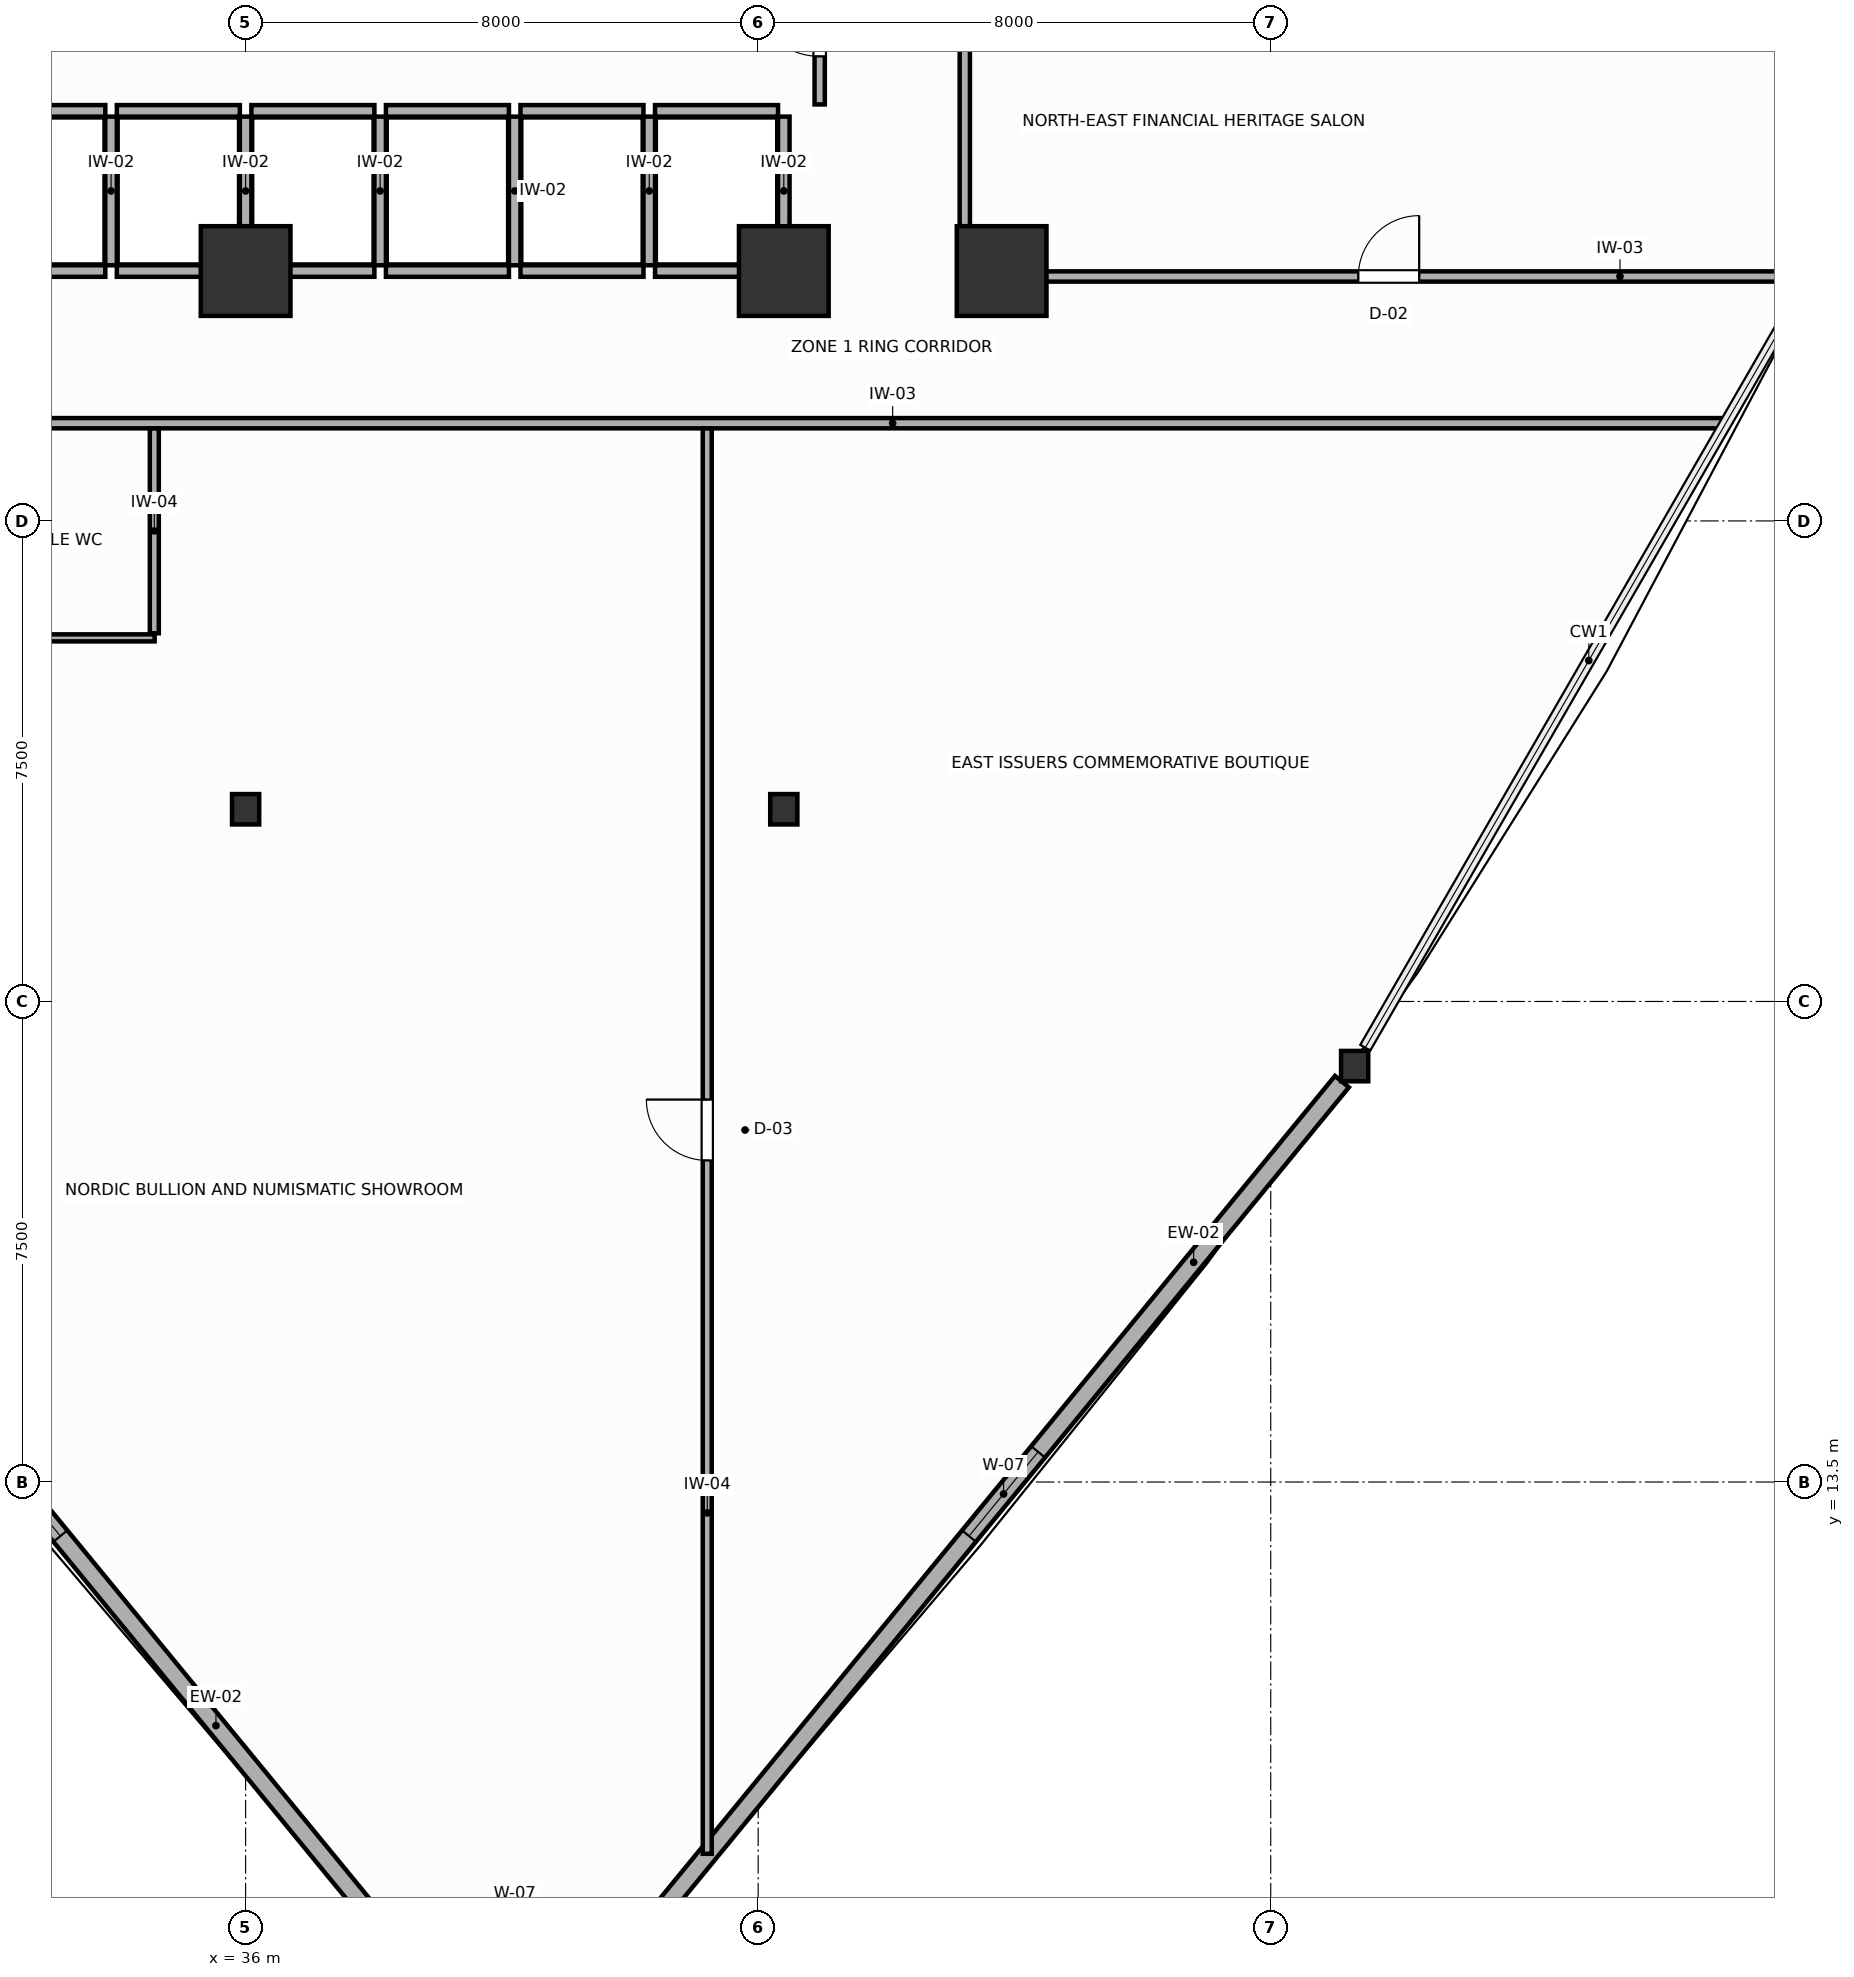
"""IFC4 building model, lengths in metres.
Left out: names, types, materials, properties, quantities, classifications, styles, units other than length and angle.
Written with IfcOpenShell. Run it as: python <this file> out.ifc"""

import sys

from ifc_helpers import new_model, si_unit, direction, frame, frame_2d, origin, origin_2d, place, context, subcontext, project, spatial, rectangle, i_section, extrude, source, transform, mapped, element, fill, save


model = new_model("IFC4")
c1 = context("Model", 3, precision=1e-05, world=origin(), true_north=direction((0.0, 1.0)))
c2 = subcontext(c1, "Body", "Model", "MODEL_VIEW")
j1 = project(units=[si_unit("LENGTHUNIT", "METRE"), si_unit("PLANEANGLEUNIT", "RADIAN")], contexts=[c1])
p1 = place(None, origin())
s1 = spatial("IfcSite", under=j1, at=p1, CompositionType="ELEMENT")
p2 = place(p1, origin())
s2 = spatial("IfcBuilding", under=s1, at=p2, CompositionType="ELEMENT")
p3 = place(p2, frame((0.0, 0.0, 95.1)))
s3 = spatial("IfcBuildingStorey", under=s2, at=p3, CompositionType="ELEMENT", Elevation=95.1)
m1 = source(origin(), c2, "Body", "SweptSolid", [
    extrude(rectangle(XDim=1.4, YDim=1.4, at=origin_2d()), origin(), (0.0, 0.0, 1.0), 3.9),
])
for number, where, z_axis, x_axis in (
    (1, (44.4, 32.4, 0.0), (0.0, 0.0, 1.0), (1.0, 0.0, 0.0)),
    (2, (36.0, 32.4, 0.0), (0.0, 0.0, 1.0), (1.0, 0.0, 0.0)),
    (3, (47.8, 32.4, 0.0), (0.0, 0.0, 1.0), (1.0, 0.0, 0.0)),
):
    element("IfcColumn", number, at=place(p3, frame(where, z_axis=z_axis, x_axis=x_axis)), inside=s3, PredefinedType="COLUMN", context=c2, shape_type="MappedRepresentation", body=[
        mapped(m1, transform((0.0, 0.0, 0.0), scale=1.0)),
    ])
m2 = source(origin(), c2, "Body", "SweptSolid", [
    extrude(i_section(OverallWidth=0.424, OverallDepth=0.474, WebThickness=0.045, FlangeThickness=0.072, FilletRadius=0.015, at=origin_2d()), origin(), (0.0, 0.0, 1.0), 3.9),
])
for number, where, z_axis, x_axis in (
    (4, (44.4, 24.0, 0.0), (0.0, 0.0, 1.0), (1.0, 0.0, 0.0)),
    (5, (36.0, 24.0, 0.0), (0.0, 0.0, 1.0), (1.0, 0.0, 0.0)),
    (6, (53.31, 19.991, 0.0), (0.0, 0.0, 1.0), (1.0, 0.0, 0.0)),
):
    element("IfcColumn", number, at=place(p3, frame(where, z_axis=z_axis, x_axis=x_axis)), inside=s3, PredefinedType="COLUMN", context=c2, shape_type="MappedRepresentation", body=[
        mapped(m2, transform((0.0, 0.0, 0.0), scale=1.0)),
    ])
p4 = place(p3, frame((27.289, 19.749, 0.0), z_axis=(0.0, 0.0, 1.0), x_axis=(0.634363798099, -0.77303465101, 0.0)))
e7 = element("IfcWall", 7, at=p4, inside=s3, PredefinedType="SOLIDWALL", context=c2, shape_type="SweptSolid", body=[
    extrude(rectangle(XDim=16.65, YDim=0.28, at=frame_2d((8.325, 0.0))), origin(), (0.0, 0.0, 1.0), 2.07),
])
p5 = place(p4, frame((7.475, 0.0, 0.75)))
e8 = element("IfcOpeningElement", 8, at=p5, cuts=e7, PredefinedType="OPENING", context=c2, shape_type="SweptSolid", body=[
    extrude(rectangle(XDim=1.7, YDim=1.1, at=frame_2d((0.85, 0.55))), frame((0.0, 0.15, 0.0), z_axis=(0.0, -1.0, 0.0), x_axis=(1.0, 0.0, 0.0)), (0.0, 0.0, 1.0), 0.3),
])
p6 = place(p3, frame((42.549, 6.878, 0.0), z_axis=(0.0, 0.0, 1.0), x_axis=(0.634372560511, 0.77302746036, 0.0)))
e9 = element("IfcWall", 9, at=p6, inside=s3, PredefinedType="SOLIDWALL", context=c2, shape_type="SweptSolid", body=[
    extrude(rectangle(XDim=16.65, YDim=0.28, at=frame_2d((8.325, 0.0))), origin(), (0.0, 0.0, 1.0), 2.07),
])
p7 = place(p6, frame((7.475, 0.0, 0.75)))
e10 = element("IfcOpeningElement", 10, at=p7, cuts=e9, PredefinedType="OPENING", context=c2, shape_type="SweptSolid", body=[
    extrude(rectangle(XDim=1.7, YDim=1.1, at=frame_2d((0.85, 0.55))), frame((0.0, 0.15, 0.0), z_axis=(0.0, -1.0, 0.0), x_axis=(1.0, 0.0, 0.0)), (0.0, 0.0, 1.0), 0.3),
])
p8 = place(p3, frame((31.89, 34.9, 0.0), z_axis=(0.0, 0.0, 1.0), x_axis=(1.0, 0.0, 0.0)))
e11 = element("IfcWall", 11, at=p8, inside=s3, PredefinedType="PARTITIONING", context=c2, shape_type="SweptSolid", body=[
    extrude(rectangle(XDim=1.92, YDim=0.18, at=frame_2d((0.96, 0.0))), origin(), (0.0, 0.0, 1.0), 3.7),
])
p9 = place(p3, frame((31.89, 32.4, 0.0), z_axis=(0.0, 0.0, 1.0), x_axis=(1.0, 0.0, 0.0)))
e12 = element("IfcWall", 12, at=p9, inside=s3, PredefinedType="PARTITIONING", context=c2, shape_type="SweptSolid", body=[
    extrude(rectangle(XDim=1.92, YDim=0.18, at=frame_2d((0.96, 0.0))), origin(), (0.0, 0.0, 1.0), 2.23),
])
p10 = place(p3, frame((33.99, 34.9, 0.0), z_axis=(0.0, 0.0, 1.0), x_axis=(1.0, 0.0, 0.0)))
e13 = element("IfcWall", 13, at=p10, inside=s3, PredefinedType="PARTITIONING", context=c2, shape_type="SweptSolid", body=[
    extrude(rectangle(XDim=1.92, YDim=0.18, at=frame_2d((0.96, 0.0))), origin(), (0.0, 0.0, 1.0), 3.7),
])
p11 = place(p3, frame((33.99, 32.4, 0.0), z_axis=(0.0, 0.0, 1.0), x_axis=(1.0, 0.0, 0.0)))
e14 = element("IfcWall", 14, at=p11, inside=s3, PredefinedType="PARTITIONING", context=c2, shape_type="SweptSolid", body=[
    extrude(rectangle(XDim=1.92, YDim=0.18, at=frame_2d((0.96, 0.0))), origin(), (0.0, 0.0, 1.0), 2.23),
])
p12 = place(p3, frame((33.9, 32.49, 0.0), z_axis=(0.0, 0.0, 1.0), x_axis=(0.0, 1.0, 0.0)))
e15 = element("IfcWall", 15, at=p12, inside=s3, PredefinedType="PARTITIONING", context=c2, shape_type="SweptSolid", body=[
    extrude(rectangle(XDim=2.32, YDim=0.18, at=frame_2d((1.16, 0.0))), origin(), (0.0, 0.0, 1.0), 3.7),
])
p13 = place(p3, frame((36.09, 34.9, 0.0), z_axis=(0.0, 0.0, 1.0), x_axis=(1.0, 0.0, 0.0)))
e16 = element("IfcWall", 16, at=p13, inside=s3, PredefinedType="PARTITIONING", context=c2, shape_type="SweptSolid", body=[
    extrude(rectangle(XDim=1.92, YDim=0.18, at=frame_2d((0.96, 0.0))), origin(), (0.0, 0.0, 1.0), 3.7),
])
p14 = place(p3, frame((36.09, 32.4, 0.0), z_axis=(0.0, 0.0, 1.0), x_axis=(1.0, 0.0, 0.0)))
e17 = element("IfcWall", 17, at=p14, inside=s3, PredefinedType="PARTITIONING", context=c2, shape_type="SweptSolid", body=[
    extrude(rectangle(XDim=1.92, YDim=0.18, at=frame_2d((0.96, 0.0))), origin(), (0.0, 0.0, 1.0), 2.23),
])
p15 = place(p3, frame((36.0, 32.49, 0.0), z_axis=(0.0, 0.0, 1.0), x_axis=(0.0, 1.0, 0.0)))
e18 = element("IfcWall", 18, at=p15, inside=s3, PredefinedType="PARTITIONING", context=c2, shape_type="SweptSolid", body=[
    extrude(rectangle(XDim=2.32, YDim=0.18, at=frame_2d((1.16, 0.0))), origin(), (0.0, 0.0, 1.0), 3.7),
])
p16 = place(p3, frame((38.19, 34.9, 0.0), z_axis=(0.0, 0.0, 1.0), x_axis=(1.0, 0.0, 0.0)))
e19 = element("IfcWall", 19, at=p16, inside=s3, PredefinedType="PARTITIONING", context=c2, shape_type="SweptSolid", body=[
    extrude(rectangle(XDim=1.92, YDim=0.18, at=frame_2d((0.96, 0.0))), origin(), (0.0, 0.0, 1.0), 3.7),
])
p17 = place(p3, frame((38.19, 32.4, 0.0), z_axis=(0.0, 0.0, 1.0), x_axis=(1.0, 0.0, 0.0)))
e20 = element("IfcWall", 20, at=p17, inside=s3, PredefinedType="PARTITIONING", context=c2, shape_type="SweptSolid", body=[
    extrude(rectangle(XDim=1.92, YDim=0.18, at=frame_2d((0.96, 0.0))), origin(), (0.0, 0.0, 1.0), 2.23),
])
p18 = place(p3, frame((38.1, 32.49, 0.0), z_axis=(0.0, 0.0, 1.0), x_axis=(0.0, 1.0, 0.0)))
e21 = element("IfcWall", 21, at=p18, inside=s3, PredefinedType="PARTITIONING", context=c2, shape_type="SweptSolid", body=[
    extrude(rectangle(XDim=2.32, YDim=0.18, at=frame_2d((1.16, 0.0))), origin(), (0.0, 0.0, 1.0), 3.7),
])
p19 = place(p3, frame((40.29, 34.9, 0.0), z_axis=(0.0, 0.0, 1.0), x_axis=(1.0, 0.0, 0.0)))
e22 = element("IfcWall", 22, at=p19, inside=s3, PredefinedType="PARTITIONING", context=c2, shape_type="SweptSolid", body=[
    extrude(rectangle(XDim=1.92, YDim=0.18, at=frame_2d((0.96, 0.0))), origin(), (0.0, 0.0, 1.0), 3.7),
])
p20 = place(p3, frame((40.29, 32.4, 0.0), z_axis=(0.0, 0.0, 1.0), x_axis=(1.0, 0.0, 0.0)))
e23 = element("IfcWall", 23, at=p20, inside=s3, PredefinedType="PARTITIONING", context=c2, shape_type="SweptSolid", body=[
    extrude(rectangle(XDim=1.92, YDim=0.18, at=frame_2d((0.96, 0.0))), origin(), (0.0, 0.0, 1.0), 2.23),
])
p21 = place(p3, frame((40.2, 32.49, 0.0), z_axis=(0.0, 0.0, 1.0), x_axis=(0.0, 1.0, 0.0)))
e24 = element("IfcWall", 24, at=p21, inside=s3, PredefinedType="PARTITIONING", context=c2, shape_type="SweptSolid", body=[
    extrude(rectangle(XDim=2.32, YDim=0.18, at=frame_2d((1.16, 0.0))), origin(), (0.0, 0.0, 1.0), 3.7),
])
p22 = place(p3, frame((42.39, 34.9, 0.0), z_axis=(0.0, 0.0, 1.0), x_axis=(1.0, 0.0, 0.0)))
e25 = element("IfcWall", 25, at=p22, inside=s3, PredefinedType="PARTITIONING", context=c2, shape_type="SweptSolid", body=[
    extrude(rectangle(XDim=1.92, YDim=0.18, at=frame_2d((0.96, 0.0))), origin(), (0.0, 0.0, 1.0), 3.7),
])
p23 = place(p3, frame((42.39, 32.4, 0.0), z_axis=(0.0, 0.0, 1.0), x_axis=(1.0, 0.0, 0.0)))
e26 = element("IfcWall", 26, at=p23, inside=s3, PredefinedType="PARTITIONING", context=c2, shape_type="SweptSolid", body=[
    extrude(rectangle(XDim=1.92, YDim=0.18, at=frame_2d((0.96, 0.0))), origin(), (0.0, 0.0, 1.0), 2.23),
])
for number, where, z_axis, x_axis in (
    (27, (42.3, 32.49, 0.0), (0.0, 0.0, 1.0), (0.0, 1.0, 0.0)),
    (28, (44.4, 32.49, 0.0), (0.0, 0.0, 1.0), (0.0, 1.0, 0.0)),
):
    element("IfcWall", number, at=place(p3, frame(where, z_axis=z_axis, x_axis=x_axis)), inside=s3, PredefinedType="PARTITIONING", context=c2, shape_type="SweptSolid", body=[
        extrude(rectangle(XDim=2.32, YDim=0.18, at=frame_2d((1.16, 0.0))), origin(), (0.0, 0.0, 1.0), 3.7),
    ])
p24 = place(p3, frame((44.96, 35.0, 0.0), z_axis=(0.0, 0.0, 1.0), x_axis=(0.0, 1.0, 0.0)))
e29 = element("IfcWall", 29, at=p24, inside=s3, PredefinedType="PARTITIONING", context=c2, shape_type="SweptSolid", body=[
    extrude(rectangle(XDim=2.65, YDim=0.16, at=frame_2d((1.325, 0.0))), origin(), (0.0, 0.0, 1.0), 3.7),
])
p25 = place(p24, frame((0.75, 0.0, 0.0)))
e30 = element("IfcOpeningElement", 30, at=p25, cuts=e29, PredefinedType="OPENING", context=c2, shape_type="SweptSolid", body=[
    extrude(rectangle(XDim=1.05, YDim=2.1, at=frame_2d((0.525, 1.05))), frame((0.0, 0.09, 0.0), z_axis=(0.0, -1.0, 0.0), x_axis=(1.0, 0.0, 0.0)), (0.0, 0.0, 1.0), 0.18),
])
p26 = place(p3, frame((21.317, 30.025, 0.0), z_axis=(0.0, 0.0, 1.0), x_axis=(1.0, 0.0, 0.0)))
e31 = element("IfcWall", 31, at=p26, inside=s3, PredefinedType="PARTITIONING", context=c2, shape_type="SweptSolid", body=[
    extrude(rectangle(XDim=37.766, YDim=0.16, at=frame_2d((18.883, 0.0))), origin(), (0.0, 0.0, 1.0), 3.7),
])
p27 = place(p26, frame((10.668, 0.0, 0.0)))
e32 = element("IfcOpeningElement", 32, at=p27, cuts=e31, PredefinedType="OPENING", context=c2, shape_type="SweptSolid", body=[
    extrude(rectangle(XDim=0.95, YDim=2.05, at=frame_2d((0.475, 1.025))), frame((0.0, 0.09, 0.0), z_axis=(0.0, -1.0, 0.0), x_axis=(1.0, 0.0, 0.0)), (0.0, 0.0, 1.0), 0.18),
])
p28 = place(p26, frame((0.93, 0.0, 0.0)))
e33 = element("IfcOpeningElement", 33, at=p28, cuts=e31, PredefinedType="OPENING", context=c2, shape_type="SweptSolid", body=[
    extrude(rectangle(XDim=0.95, YDim=2.05, at=frame_2d((0.475, 1.025))), frame((0.0, 0.09, 0.0), z_axis=(0.0, -1.0, 0.0), x_axis=(1.0, 0.0, 0.0)), (0.0, 0.0, 1.0), 0.18),
])
p29 = place(p3, frame((47.225, 32.31, 0.0), z_axis=(0.0, 0.0, 1.0), x_axis=(0.0, 1.0, 0.0)))
e34 = element("IfcWall", 34, at=p29, inside=s3, PredefinedType="PARTITIONING", context=c2, shape_type="SweptSolid", body=[
    extrude(rectangle(XDim=23.028, YDim=0.16, at=frame_2d((11.514, 0.0))), origin(), (0.0, 0.0, 1.0), 2.23),
])
p30 = place(p29, frame((11.59, 0.0, 0.0)))
e35 = element("IfcOpeningElement", 35, at=p30, cuts=e34, PredefinedType="OPENING", context=c2, shape_type="SweptSolid", body=[
    extrude(rectangle(XDim=0.95, YDim=2.05, at=frame_2d((0.475, 1.025))), frame((0.0, 0.09, 0.0), z_axis=(0.0, -1.0, 0.0), x_axis=(1.0, 0.0, 0.0)), (0.0, 0.0, 1.0), 0.18),
])
p31 = place(p3, frame((47.307, 32.315, 0.0), z_axis=(0.0, 0.0, 1.0), x_axis=(1.0, 0.0, 0.0)))
e36 = element("IfcWall", 36, at=p31, inside=s3, PredefinedType="PARTITIONING", context=c2, shape_type="SweptSolid", body=[
    extrude(rectangle(XDim=13.098, YDim=0.16, at=frame_2d((6.549, 0.0))), origin(), (0.0, 0.0, 1.0), 2.23),
])
p32 = place(p31, frame((6.06, 0.0, 0.0)))
e37 = element("IfcOpeningElement", 37, at=p32, cuts=e36, PredefinedType="OPENING", context=c2, shape_type="SweptSolid", body=[
    extrude(rectangle(XDim=0.95, YDim=2.05, at=frame_2d((0.475, 1.025))), frame((0.0, 0.09, 0.0), z_axis=(0.0, -1.0, 0.0), x_axis=(1.0, 0.0, 0.0)), (0.0, 0.0, 1.0), 0.18),
])
p33 = place(p3, frame((43.205, 7.698, 0.0), z_axis=(0.0, 0.0, 1.0), x_axis=(0.0, 1.0, 0.0)))
e38 = element("IfcWall", 38, at=p33, inside=s3, PredefinedType="PARTITIONING", context=c2, shape_type="SweptSolid", body=[
    extrude(rectangle(XDim=22.246, YDim=0.14, at=frame_2d((11.123, 0.0))), origin(), (0.0, 0.0, 1.0), 2.23),
])
p34 = place(p33, frame((10.821, 0.0, 0.0)))
e39 = element("IfcOpeningElement", 39, at=p34, cuts=e38, PredefinedType="OPENING", context=c2, shape_type="SweptSolid", body=[
    extrude(rectangle(XDim=0.95, YDim=2.05, at=frame_2d((0.475, 1.025))), frame((0.0, 0.08, 0.0), z_axis=(0.0, -1.0, 0.0), x_axis=(1.0, 0.0, 0.0)), (0.0, 0.0, 1.0), 0.16),
])
p35 = place(p3, frame((30.34, 26.675, 0.0), z_axis=(0.0, 0.0, 1.0), x_axis=(1.0, 0.0, 0.0)))
e40 = element("IfcWall", 40, at=p35, inside=s3, PredefinedType="MOVABLE", context=c2, shape_type="SweptSolid", body=[
    extrude(rectangle(XDim=4.24, YDim=0.11, at=frame_2d((2.12, 0.0))), origin(), (0.0, 0.0, 1.0), 3.7),
])
p36 = place(p3, frame((34.575, 26.747, 0.0), z_axis=(0.0, 0.0, 1.0), x_axis=(0.0, 1.0, 0.0)))
e41 = element("IfcWall", 41, at=p36, inside=s3, PredefinedType="PARTITIONING", context=c2, shape_type="SweptSolid", body=[
    extrude(rectangle(XDim=3.196, YDim=0.14, at=frame_2d((1.598, 0.0))), origin(), (0.0, 0.0, 1.0), 3.7),
])
p37 = place(p5, origin())
e42 = element("IfcWindow", 42, at=p37, inside=s3, PartitioningType="SINGLE_PANEL", PredefinedType="WINDOW", context=c2, shape_type="SweptSolid", body=[
    extrude(rectangle(XDim=1.7, YDim=1.1, at=frame_2d((0.85, 0.55))), frame((0.0, 0.03, 0.0), z_axis=(0.0, -1.0, 0.0), x_axis=(1.0, 0.0, 0.0)), (0.0, 0.0, 1.0), 0.06),
])
fill(e8, e42)
p38 = place(p7, origin())
e43 = element("IfcWindow", 43, at=p38, inside=s3, PartitioningType="SINGLE_PANEL", PredefinedType="WINDOW", context=c2, shape_type="SweptSolid", body=[
    extrude(rectangle(XDim=1.7, YDim=1.1, at=frame_2d((0.85, 0.55))), frame((0.0, 0.03, 0.0), z_axis=(0.0, -1.0, 0.0), x_axis=(1.0, 0.0, 0.0)), (0.0, 0.0, 1.0), 0.06),
])
fill(e10, e43)
p39 = place(p25, origin())
e44 = element("IfcDoor", 44, at=p39, inside=s3, OperationType="SINGLE_SWING_RIGHT", PredefinedType="DOOR", context=c2, shape_type="SweptSolid", body=[
    extrude(rectangle(XDim=1.05, YDim=2.1, at=frame_2d((0.525, 1.05))), frame((0.0, 0.025, 0.0), z_axis=(0.0, -1.0, 0.0), x_axis=(1.0, 0.0, 0.0)), (0.0, 0.0, 1.0), 0.05),
])
fill(e30, e44)
p40 = place(p32, origin())
e45 = element("IfcDoor", 45, at=p40, inside=s3, OperationType="SINGLE_SWING_RIGHT", PredefinedType="DOOR", context=c2, shape_type="SweptSolid", body=[
    extrude(rectangle(XDim=0.95, YDim=2.05, at=frame_2d((0.475, 1.025))), frame((0.0, 0.025, 0.0), z_axis=(0.0, -1.0, 0.0), x_axis=(1.0, 0.0, 0.0)), (0.0, 0.0, 1.0), 0.05),
])
fill(e37, e45)
p41 = place(p34, origin())
e46 = element("IfcDoor", 46, at=p41, inside=s3, OperationType="SINGLE_SWING_RIGHT", PredefinedType="DOOR", context=c2, shape_type="SweptSolid", body=[
    extrude(rectangle(XDim=0.95, YDim=2.05, at=frame_2d((0.475, 1.025))), frame((0.0, 0.025, 0.0), z_axis=(0.0, -1.0, 0.0), x_axis=(1.0, 0.0, 0.0)), (0.0, 0.0, 1.0), 0.05),
])
fill(e39, e46)
save(model, sys.argv[1])
